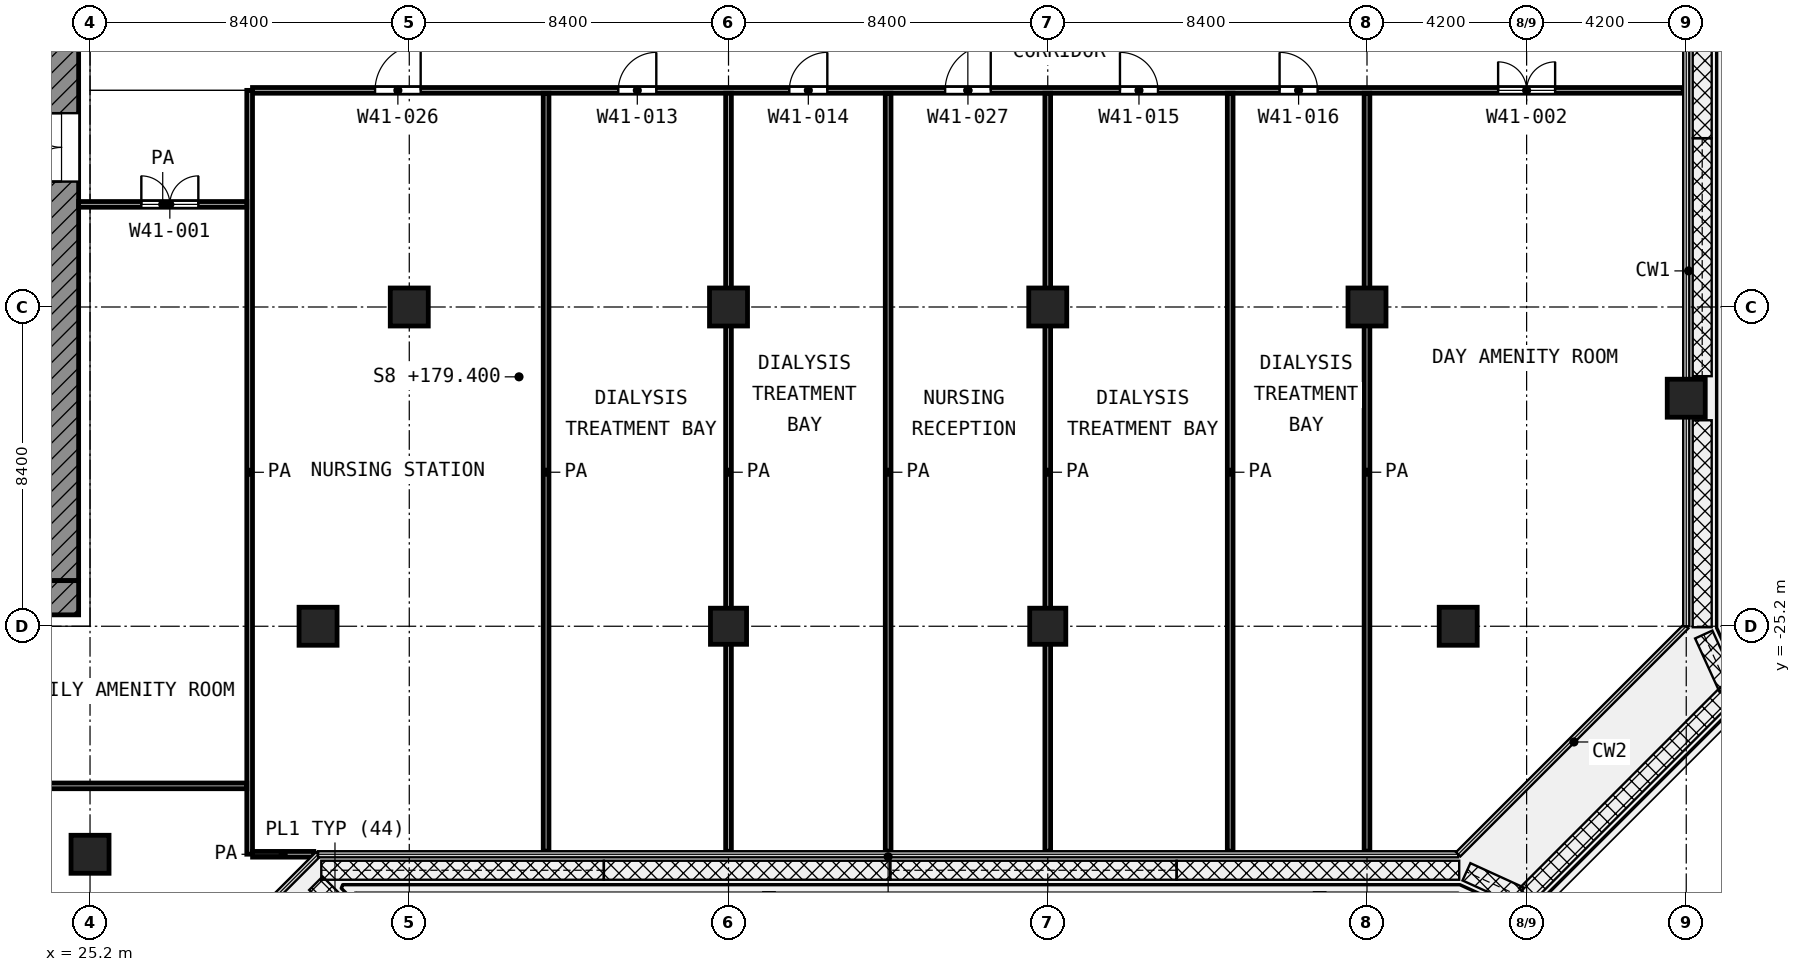
"""IFC4 building model, lengths in metres.
Left out: names, types, materials, properties, quantities, classifications, styles, units other than length and angle.
Written with IfcOpenShell. Run it as: python <this file> out.ifc"""

import sys

from ifc_helpers import new_model, si_unit, direction, frame, frame_2d, origin, origin_2d, place, context, subcontext, project, spatial, rectangle, extrude, element, fill, save


model = new_model("IFC4")
c1 = context("Model", 3, precision=1e-05, world=origin(), true_north=direction((0.0, 1.0)))
c2 = subcontext(c1, "Body", "Model", "MODEL_VIEW")
j1 = project(units=[si_unit("LENGTHUNIT", "METRE"), si_unit("PLANEANGLEUNIT", "RADIAN")], contexts=[c1])
p1 = place(None, origin())
s1 = spatial("IfcSite", under=j1, at=p1, CompositionType="ELEMENT")
p2 = place(p1, origin())
s2 = spatial("IfcBuilding", under=s1, at=p2, CompositionType="ELEMENT")
p3 = place(p2, frame((0.0, 0.0, 179.4)))
s3 = spatial("IfcBuildingStorey", under=s2, at=p3, CompositionType="ELEMENT", Elevation=179.4)
for number, where, z_axis, x_axis in (
    (1, (33.6, -16.8, 0.0), (0.0, 0.0, 1.0), (1.0, 0.0, 0.0)),
    (2, (42.0, -16.8, 0.0), (0.0, 0.0, 1.0), (1.0, 0.0, 0.0)),
    (3, (50.4, -16.8, 0.0), (0.0, 0.0, 1.0), (1.0, 0.0, 0.0)),
    (4, (58.8, -16.8, 0.0), (0.0, 0.0, 1.0), (1.0, 0.0, 0.0)),
    (5, (67.2, -19.2, 0.0), (0.0, 0.0, 1.0), (1.0, 0.0, 0.0)),
    (6, (31.2, -25.2, 0.0), (0.0, 0.0, 1.0), (1.0, 0.0, 0.0)),
):
    element("IfcColumn", number, at=place(p3, frame(where, z_axis=z_axis, x_axis=x_axis)), inside=s3, PredefinedType="COLUMN", context=c2, shape_type="SweptSolid", body=[
        extrude(rectangle(XDim=1.0, YDim=1.0, at=origin_2d()), origin(), (0.0, 0.0, 1.0), 4.2),
    ])
for number, where, z_axis, x_axis in (
    (7, (42.0, -25.2, 0.0), (0.0, 0.0, 1.0), (1.0, 0.0, 0.0)),
    (8, (50.4, -25.2, 0.0), (0.0, 0.0, 1.0), (1.0, 0.0, 0.0)),
):
    element("IfcColumn", number, at=place(p3, frame(where, z_axis=z_axis, x_axis=x_axis)), inside=s3, PredefinedType="COLUMN", context=c2, shape_type="SweptSolid", body=[
        extrude(rectangle(XDim=0.95, YDim=0.95, at=origin_2d()), origin(), (0.0, 0.0, 1.0), 4.2),
    ])
for number, where, z_axis, x_axis in (
    (9, (61.2, -25.2, 0.0), (0.0, 0.0, 1.0), (1.0, 0.0, 0.0)),
    (10, (25.2, -31.2, 0.0), (0.0, 0.0, 1.0), (1.0, 0.0, 0.0)),
):
    element("IfcColumn", number, at=place(p3, frame(where, z_axis=z_axis, x_axis=x_axis)), inside=s3, PredefinedType="COLUMN", context=c2, shape_type="SweptSolid", body=[
        extrude(rectangle(XDim=1.0, YDim=1.0, at=origin_2d()), origin(), (0.0, 0.0, 1.0), 4.2),
    ])
p4 = place(p3, frame((24.45, -24.0, 0.0), z_axis=(0.0, 0.0, 1.0), x_axis=(0.0, 1.0, 0.0)))
e11 = element("IfcWall", 11, at=p4, inside=s3, PredefinedType="SHEAR", context=c2, shape_type="SweptSolid", body=[
    extrude(rectangle(XDim=18.6, YDim=0.9, at=frame_2d((9.3, 0.0))), origin(), (0.0, 0.0, 1.0), 3.6),
])
p5 = place(p4, frame((10.5, 0.0, 0.0)))
e12 = element("IfcOpeningElement", 12, at=p5, cuts=e11, PredefinedType="OPENING", context=c2, shape_type="SweptSolid", body=[
    extrude(rectangle(XDim=1.8, YDim=2.1, at=frame_2d((0.9, 1.05))), frame((0.0, 0.46, 0.0), z_axis=(0.0, -1.0, 0.0), x_axis=(1.0, 0.0, 0.0)), (0.0, 0.0, 1.0), 0.92),
])
p6 = place(p3, frame((24.45, -24.9, 0.0), z_axis=(0.0, 0.0, 1.0), x_axis=(0.0, 1.0, 0.0)))
e13 = element("IfcWall", 13, at=p6, inside=s3, PredefinedType="SHEAR", context=c2, shape_type="SweptSolid", body=[
    extrude(rectangle(XDim=0.9, YDim=0.9, at=frame_2d((0.45, 0.0))), origin(), (0.0, 0.0, 1.0), 3.6),
])
p7 = place(p3, frame((29.477, -31.2, 0.0), z_axis=(0.0, 0.0, 1.0), x_axis=(1.0, 0.0, 0.0)))
e14 = element("IfcWall", 14, at=p7, inside=s3, PredefinedType="PARTITIONING", context=c2, shape_type="SweptSolid", body=[
    extrude(rectangle(XDim=1.61, YDim=0.15, at=frame_2d((0.805, 0.0))), origin(), (0.0, 0.0, 1.0), 3.6),
])
p8 = place(p3, frame((11.175, -29.4, 0.0), z_axis=(0.0, 0.0, 1.0), x_axis=(1.0, 0.0, 0.0)))
e15 = element("IfcWall", 15, at=p8, inside=s3, PredefinedType="PARTITIONING", context=c2, shape_type="SweptSolid", body=[
    extrude(rectangle(XDim=18.15, YDim=0.15, at=frame_2d((9.075, 0.0))), origin(), (0.0, 0.0, 1.0), 3.6),
])
p9 = place(p3, frame((24.9, -14.1, 0.0), z_axis=(0.0, 0.0, 1.0), x_axis=(1.0, 0.0, 0.0)))
e16 = element("IfcWall", 16, at=p9, inside=s3, PredefinedType="PARTITIONING", context=c2, shape_type="SweptSolid", body=[
    extrude(rectangle(XDim=4.425, YDim=0.15, at=frame_2d((2.212, 0.0))), origin(), (0.0, 0.0, 1.0), 3.6),
])
p10 = place(p9, frame((1.65, 0.0, 0.0)))
e17 = element("IfcOpeningElement", 17, at=p10, cuts=e16, PredefinedType="OPENING", context=c2, shape_type="SweptSolid", body=[
    extrude(rectangle(XDim=1.5, YDim=2.1, at=frame_2d((0.75, 1.05))), frame((0.0, 0.085, 0.0), z_axis=(0.0, -1.0, 0.0), x_axis=(1.0, 0.0, 0.0)), (0.0, 0.0, 1.0), 0.17),
])
p11 = place(p3, frame((29.475, -11.1, 0.0), z_axis=(0.0, 0.0, 1.0), x_axis=(1.0, 0.0, 0.0)))
e18 = element("IfcWall", 18, at=p11, inside=s3, PredefinedType="PARTITIONING", context=c2, shape_type="SweptSolid", body=[
    extrude(rectangle(XDim=37.645, YDim=0.15, at=frame_2d((18.823, 0.0))), origin(), (0.0, 0.0, 1.0), 3.6),
])
p12 = place(p11, frame((3.225, 0.0, 0.0)))
e19 = element("IfcOpeningElement", 19, at=p12, cuts=e18, PredefinedType="OPENING", context=c2, shape_type="SweptSolid", body=[
    extrude(rectangle(XDim=1.2, YDim=2.1, at=frame_2d((0.6, 1.05))), frame((0.0, 0.085, 0.0), z_axis=(0.0, -1.0, 0.0), x_axis=(1.0, 0.0, 0.0)), (0.0, 0.0, 1.0), 0.17),
])
p13 = place(p11, frame((9.625, 0.0, 0.0)))
e20 = element("IfcOpeningElement", 20, at=p13, cuts=e18, PredefinedType="OPENING", context=c2, shape_type="SweptSolid", body=[
    extrude(rectangle(XDim=1.0, YDim=2.1, at=frame_2d((0.5, 1.05))), frame((0.0, 0.085, 0.0), z_axis=(0.0, -1.0, 0.0), x_axis=(1.0, 0.0, 0.0)), (0.0, 0.0, 1.0), 0.17),
])
p14 = place(p11, frame((14.125, 0.0, 0.0)))
e21 = element("IfcOpeningElement", 21, at=p14, cuts=e18, PredefinedType="OPENING", context=c2, shape_type="SweptSolid", body=[
    extrude(rectangle(XDim=1.0, YDim=2.1, at=frame_2d((0.5, 1.05))), frame((0.0, 0.085, 0.0), z_axis=(0.0, -1.0, 0.0), x_axis=(1.0, 0.0, 0.0)), (0.0, 0.0, 1.0), 0.17),
])
p15 = place(p11, frame((18.225, 0.0, 0.0)))
e22 = element("IfcOpeningElement", 22, at=p15, cuts=e18, PredefinedType="OPENING", context=c2, shape_type="SweptSolid", body=[
    extrude(rectangle(XDim=1.2, YDim=2.1, at=frame_2d((0.6, 1.05))), frame((0.0, 0.085, 0.0), z_axis=(0.0, -1.0, 0.0), x_axis=(1.0, 0.0, 0.0)), (0.0, 0.0, 1.0), 0.17),
])
p16 = place(p11, frame((22.825, 0.0, 0.0)))
e23 = element("IfcOpeningElement", 23, at=p16, cuts=e18, PredefinedType="OPENING", context=c2, shape_type="SweptSolid", body=[
    extrude(rectangle(XDim=1.0, YDim=2.1, at=frame_2d((0.5, 1.05))), frame((0.0, 0.085, 0.0), z_axis=(0.0, -1.0, 0.0), x_axis=(1.0, 0.0, 0.0)), (0.0, 0.0, 1.0), 0.17),
])
p17 = place(p11, frame((27.025, 0.0, 0.0)))
e24 = element("IfcOpeningElement", 24, at=p17, cuts=e18, PredefinedType="OPENING", context=c2, shape_type="SweptSolid", body=[
    extrude(rectangle(XDim=1.0, YDim=2.1, at=frame_2d((0.5, 1.05))), frame((0.0, 0.085, 0.0), z_axis=(0.0, -1.0, 0.0), x_axis=(1.0, 0.0, 0.0)), (0.0, 0.0, 1.0), 0.17),
])
p18 = place(p11, frame((32.775, 0.0, 0.0)))
e25 = element("IfcOpeningElement", 25, at=p18, cuts=e18, PredefinedType="OPENING", context=c2, shape_type="SweptSolid", body=[
    extrude(rectangle(XDim=1.5, YDim=2.1, at=frame_2d((0.75, 1.05))), frame((0.0, 0.085, 0.0), z_axis=(0.0, -1.0, 0.0), x_axis=(1.0, 0.0, 0.0)), (0.0, 0.0, 1.0), 0.17),
])
p19 = place(p3, frame((29.4, -31.198, 0.0), z_axis=(0.0, 0.0, 1.0), x_axis=(0.0, 1.0, 0.0)))
e26 = element("IfcWall", 26, at=p19, inside=s3, PredefinedType="PARTITIONING", context=c2, shape_type="SweptSolid", body=[
    extrude(rectangle(XDim=20.098, YDim=0.15, at=frame_2d((10.049, 0.0))), origin(), (0.0, 0.0, 1.0), 3.6),
])
for number, where, z_axis, x_axis in (
    (27, (37.2, -31.12, 0.0), (0.0, 0.0, 1.0), (0.0, 1.0, 0.0)),
    (28, (42.0, -31.12, 0.0), (0.0, 0.0, 1.0), (0.0, 1.0, 0.0)),
    (29, (46.2, -31.12, 0.0), (0.0, 0.0, 1.0), (0.0, 1.0, 0.0)),
    (30, (50.4, -31.12, 0.0), (0.0, 0.0, 1.0), (0.0, 1.0, 0.0)),
    (31, (55.2, -31.12, 0.0), (0.0, 0.0, 1.0), (0.0, 1.0, 0.0)),
    (32, (58.8, -31.12, 0.0), (0.0, 0.0, 1.0), (0.0, 1.0, 0.0)),
):
    element("IfcWall", number, at=place(p3, frame(where, z_axis=z_axis, x_axis=x_axis)), inside=s3, PredefinedType="PARTITIONING", context=c2, shape_type="SweptSolid", body=[
        extrude(rectangle(XDim=19.945, YDim=0.15, at=frame_2d((9.973, 0.0))), origin(), (0.0, 0.0, 1.0), 3.6),
    ])
p20 = place(p5, origin())
e33 = element("IfcDoor", 33, at=p20, inside=s3, OperationType="DOUBLE_DOOR_SINGLE_SWING", PredefinedType="DOOR", context=c2, shape_type="SweptSolid", body=[
    extrude(rectangle(XDim=1.8, YDim=2.1, at=frame_2d((0.9, 1.05))), frame((0.0, 0.025, 0.0), z_axis=(0.0, -1.0, 0.0), x_axis=(1.0, 0.0, 0.0)), (0.0, 0.0, 1.0), 0.05),
])
fill(e12, e33)
p21 = place(p10, origin())
e34 = element("IfcDoor", 34, at=p21, inside=s3, OperationType="DOUBLE_DOOR_SINGLE_SWING", PredefinedType="DOOR", context=c2, shape_type="SweptSolid", body=[
    extrude(rectangle(XDim=1.5, YDim=2.1, at=frame_2d((0.75, 1.05))), frame((0.0, 0.025, 0.0), z_axis=(0.0, -1.0, 0.0), x_axis=(1.0, 0.0, 0.0)), (0.0, 0.0, 1.0), 0.05),
])
fill(e17, e34)
p22 = place(p12, origin())
e35 = element("IfcDoor", 35, at=p22, inside=s3, OperationType="SINGLE_SWING_RIGHT", PredefinedType="DOOR", context=c2, shape_type="SweptSolid", body=[
    extrude(rectangle(XDim=1.2, YDim=2.1, at=frame_2d((0.6, 1.05))), frame((0.0, 0.025, 0.0), z_axis=(0.0, -1.0, 0.0), x_axis=(1.0, 0.0, 0.0)), (0.0, 0.0, 1.0), 0.05),
])
fill(e19, e35)
p23 = place(p13, origin())
e36 = element("IfcDoor", 36, at=p23, inside=s3, OperationType="SINGLE_SWING_RIGHT", PredefinedType="DOOR", context=c2, shape_type="SweptSolid", body=[
    extrude(rectangle(XDim=1.0, YDim=2.1, at=frame_2d((0.5, 1.05))), frame((0.0, 0.025, 0.0), z_axis=(0.0, -1.0, 0.0), x_axis=(1.0, 0.0, 0.0)), (0.0, 0.0, 1.0), 0.05),
])
fill(e20, e36)
p24 = place(p14, origin())
e37 = element("IfcDoor", 37, at=p24, inside=s3, OperationType="SINGLE_SWING_RIGHT", PredefinedType="DOOR", context=c2, shape_type="SweptSolid", body=[
    extrude(rectangle(XDim=1.0, YDim=2.1, at=frame_2d((0.5, 1.05))), frame((0.0, 0.025, 0.0), z_axis=(0.0, -1.0, 0.0), x_axis=(1.0, 0.0, 0.0)), (0.0, 0.0, 1.0), 0.05),
])
fill(e21, e37)
p25 = place(p15, origin())
e38 = element("IfcDoor", 38, at=p25, inside=s3, OperationType="SINGLE_SWING_RIGHT", PredefinedType="DOOR", context=c2, shape_type="SweptSolid", body=[
    extrude(rectangle(XDim=1.2, YDim=2.1, at=frame_2d((0.6, 1.05))), frame((0.0, 0.025, 0.0), z_axis=(0.0, -1.0, 0.0), x_axis=(1.0, 0.0, 0.0)), (0.0, 0.0, 1.0), 0.05),
])
fill(e22, e38)
p26 = place(p16, origin())
e39 = element("IfcDoor", 39, at=p26, inside=s3, OperationType="SINGLE_SWING_LEFT", PredefinedType="DOOR", context=c2, shape_type="SweptSolid", body=[
    extrude(rectangle(XDim=1.0, YDim=2.1, at=frame_2d((0.5, 1.05))), frame((0.0, 0.025, 0.0), z_axis=(0.0, -1.0, 0.0), x_axis=(1.0, 0.0, 0.0)), (0.0, 0.0, 1.0), 0.05),
])
fill(e23, e39)
p27 = place(p17, origin())
e40 = element("IfcDoor", 40, at=p27, inside=s3, OperationType="SINGLE_SWING_LEFT", PredefinedType="DOOR", context=c2, shape_type="SweptSolid", body=[
    extrude(rectangle(XDim=1.0, YDim=2.1, at=frame_2d((0.5, 1.05))), frame((0.0, 0.025, 0.0), z_axis=(0.0, -1.0, 0.0), x_axis=(1.0, 0.0, 0.0)), (0.0, 0.0, 1.0), 0.05),
])
fill(e24, e40)
p28 = place(p18, origin())
e41 = element("IfcDoor", 41, at=p28, inside=s3, OperationType="DOUBLE_DOOR_SINGLE_SWING", PredefinedType="DOOR", context=c2, shape_type="SweptSolid", body=[
    extrude(rectangle(XDim=1.5, YDim=2.1, at=frame_2d((0.75, 1.05))), frame((0.0, 0.025, 0.0), z_axis=(0.0, -1.0, 0.0), x_axis=(1.0, 0.0, 0.0)), (0.0, 0.0, 1.0), 0.05),
])
fill(e25, e41)
save(model, sys.argv[1])
